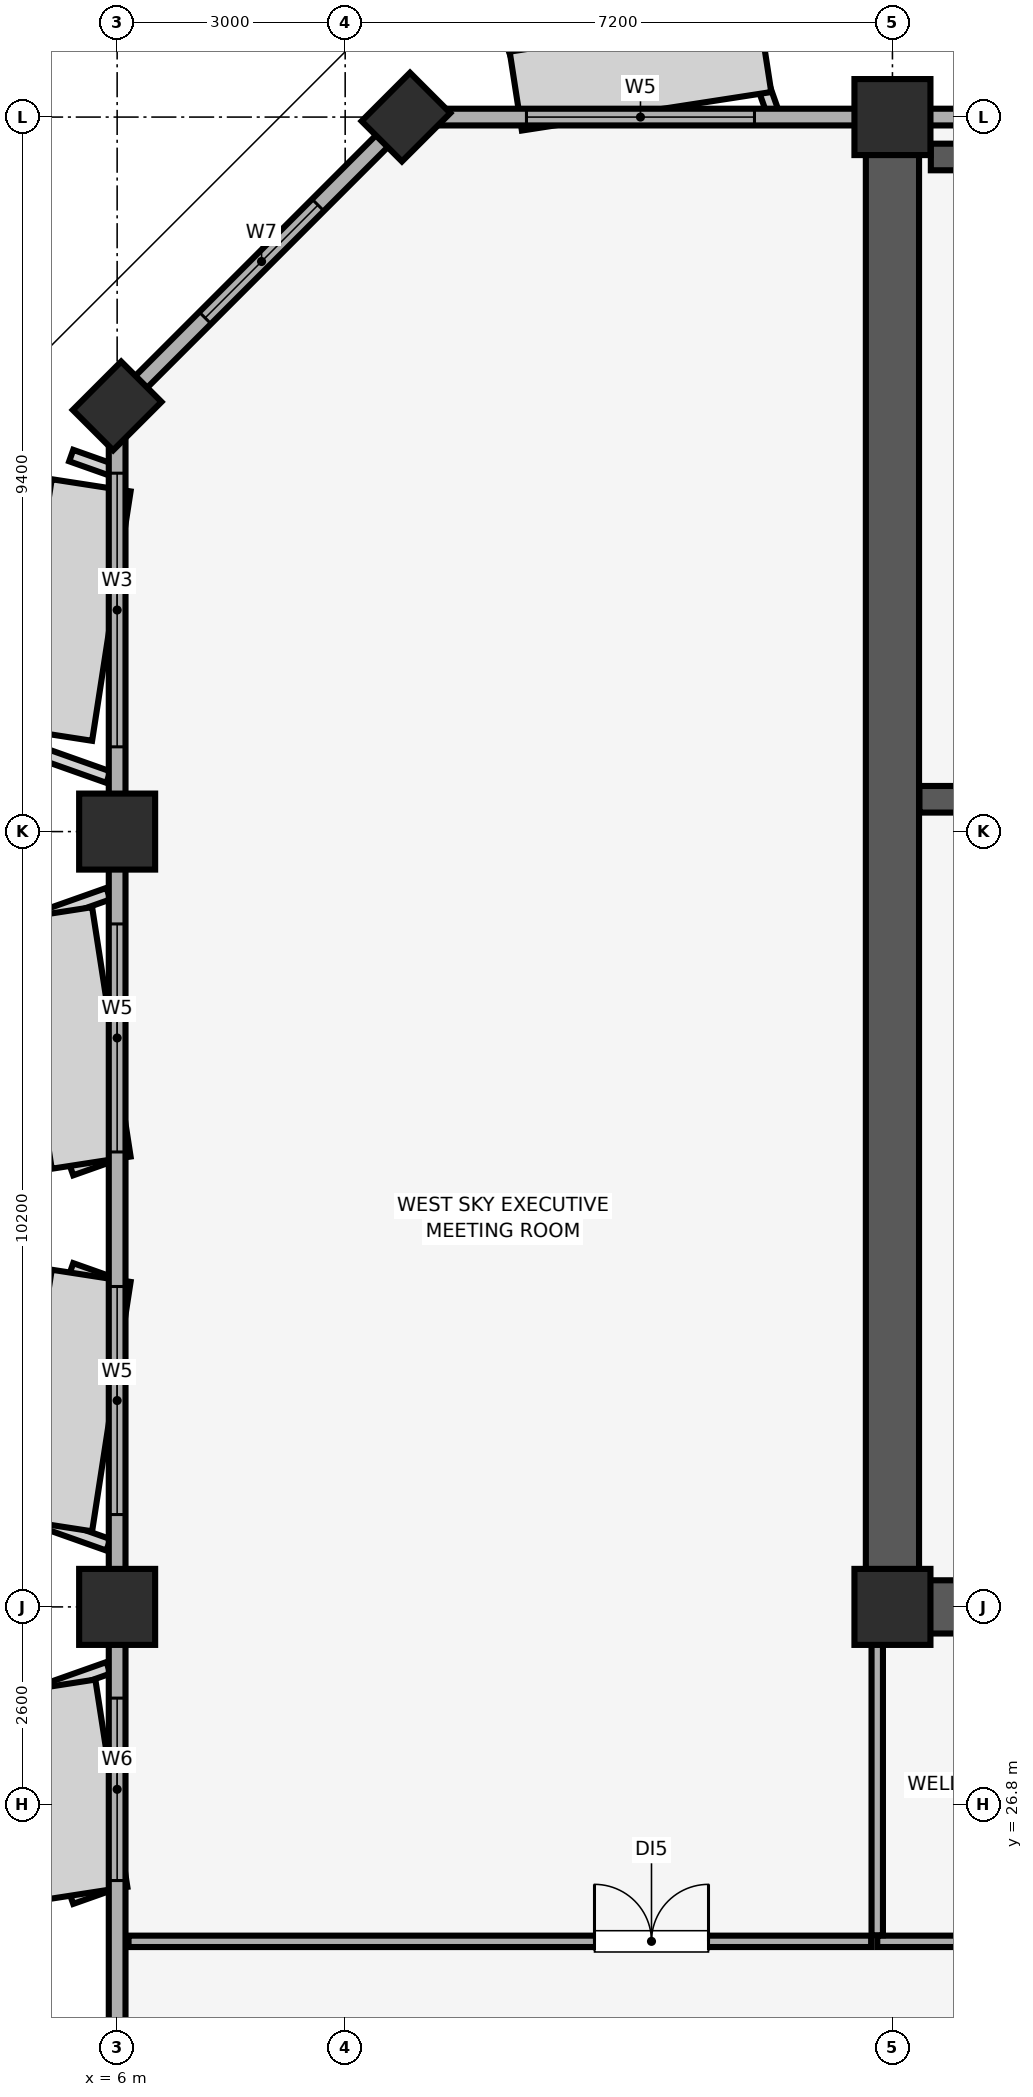
"""IFC4 building model, lengths in metres.
Left out: names, types, materials, properties, quantities, classifications, styles, units other than length and angle.
Written with IfcOpenShell. Run it as: python <this file> out.ifc"""

import sys

from ifc_helpers import new_model, si_unit, direction, frame, frame_2d, origin, origin_2d, place, context, subcontext, project, spatial, rectangle, extrude, element, fill, save


model = new_model("IFC4")
c1 = context("Model", 3, precision=1e-05, world=origin(), true_north=direction((0.0, 1.0)))
c2 = subcontext(c1, "Body", "Model", "MODEL_VIEW")
j1 = project(units=[si_unit("LENGTHUNIT", "METRE"), si_unit("PLANEANGLEUNIT", "RADIAN")], contexts=[c1])
p1 = place(None, origin())
s1 = spatial("IfcSite", under=j1, at=p1, CompositionType="ELEMENT")
p2 = place(p1, origin())
s2 = spatial("IfcBuilding", under=s1, at=p2, CompositionType="ELEMENT")
p3 = place(p2, frame((0.0, 0.0, 276.55)))
s3 = spatial("IfcBuildingStorey", under=s2, at=p3, CompositionType="ELEMENT", Elevation=276.55)
for number, where, z_axis, x_axis in (
    (1, (6.0, 29.4, 0.0), (0.0, 0.0, 1.0), (1.0, 0.0, 0.0)),
    (2, (6.0, 39.6, 0.0), (0.0, 0.0, 1.0), (1.0, 0.0, 0.0)),
):
    element("IfcColumn", number, at=place(p3, frame(where, z_axis=z_axis, x_axis=x_axis)), inside=s3, PredefinedType="COLUMN", context=c2, shape_type="SweptSolid", body=[
        extrude(rectangle(XDim=1.0, YDim=1.0, at=origin_2d()), origin(), (0.0, 0.0, 1.0), 3.6),
    ])
for number, where, z_axis, x_axis in (
    (3, (9.8, 49.0, 0.0), (0.0, 0.0, 1.0), (0.707, 0.707, 0.0)),
    (4, (6.0, 45.2, 0.0), (0.0, 0.0, 1.0), (0.707, 0.707, 0.0)),
):
    element("IfcColumn", number, at=place(p3, frame(where, z_axis=z_axis, x_axis=x_axis)), inside=s3, PredefinedType="PILASTER", context=c2, shape_type="SweptSolid", body=[
        extrude(rectangle(XDim=0.9, YDim=0.75, at=origin_2d()), origin(), (0.0, 0.0, 1.0), 3.6),
    ])
for number, where, z_axis, x_axis in (
    (5, (16.2, 29.4, 0.0), (0.0, 0.0, 1.0), (1.0, 0.0, 0.0)),
    (6, (16.2, 49.0, 0.0), (0.0, 0.0, 1.0), (1.0, 0.0, 0.0)),
):
    element("IfcColumn", number, at=place(p3, frame(where, z_axis=z_axis, x_axis=x_axis)), inside=s3, PredefinedType="COLUMN", context=c2, shape_type="SweptSolid", body=[
        extrude(rectangle(XDim=1.0, YDim=1.0, at=origin_2d()), origin(), (0.0, 0.0, 1.0), 3.6),
    ])
p4 = place(p3, frame((74.2, 49.0, 0.0), z_axis=(0.0, 0.0, 1.0), x_axis=(-1.0, 0.0, 0.0)))
e7 = element("IfcWall", 7, at=p4, inside=s3, PredefinedType="SOLIDWALL", context=c2, shape_type="SweptSolid", body=[
    extrude(rectangle(XDim=64.4, YDim=0.22, at=frame_2d((32.2, 0.0))), origin(), (0.0, 0.0, 1.0), 2.8),
])
p5 = place(p4, frame((59.815, 0.0, 0.85)))
e8 = element("IfcOpeningElement", 8, at=p5, cuts=e7, PredefinedType="OPENING", context=c2, shape_type="SweptSolid", body=[
    extrude(rectangle(XDim=3.0, YDim=1.5, at=frame_2d((1.5, 0.75))), frame((0.0, 0.12, 0.0), z_axis=(0.0, -1.0, 0.0), x_axis=(1.0, 0.0, 0.0)), (0.0, 0.0, 1.0), 0.24),
])
p6 = place(p4, frame((1.585, 0.0, 0.85)))
e9 = element("IfcOpeningElement", 9, at=p6, cuts=e7, PredefinedType="OPENING", context=c2, shape_type="SweptSolid", body=[
    extrude(rectangle(XDim=3.0, YDim=1.5, at=frame_2d((1.5, 0.75))), frame((0.0, 0.12, 0.0), z_axis=(0.0, -1.0, 0.0), x_axis=(1.0, 0.0, 0.0)), (0.0, 0.0, 1.0), 0.24),
])
p7 = place(p4, frame((46.665, 0.0, 0.9)))
e10 = element("IfcOpeningElement", 10, at=p7, cuts=e7, PredefinedType="OPENING", context=c2, shape_type="SweptSolid", body=[
    extrude(rectangle(XDim=1.5, YDim=1.4, at=frame_2d((0.75, 0.7))), frame((0.0, 0.12, 0.0), z_axis=(0.0, -1.0, 0.0), x_axis=(1.0, 0.0, 0.0)), (0.0, 0.0, 1.0), 0.24),
])
p8 = place(p4, frame((38.85, 0.0, 0.9)))
e11 = element("IfcOpeningElement", 11, at=p8, cuts=e7, PredefinedType="OPENING", context=c2, shape_type="SweptSolid", body=[
    extrude(rectangle(XDim=3.6, YDim=1.5, at=frame_2d((1.8, 0.75))), frame((0.0, 0.12, 0.0), z_axis=(0.0, -1.0, 0.0), x_axis=(1.0, 0.0, 0.0)), (0.0, 0.0, 1.0), 0.24),
])
p9 = place(p4, frame((25.45, 0.0, 0.9)))
e12 = element("IfcOpeningElement", 12, at=p9, cuts=e7, PredefinedType="OPENING", context=c2, shape_type="SweptSolid", body=[
    extrude(rectangle(XDim=1.5, YDim=1.4, at=frame_2d((0.75, 0.7))), frame((0.0, 0.12, 0.0), z_axis=(0.0, -1.0, 0.0), x_axis=(1.0, 0.0, 0.0)), (0.0, 0.0, 1.0), 0.24),
])
p10 = place(p4, frame((21.8, 0.0, 0.9)))
e13 = element("IfcOpeningElement", 13, at=p10, cuts=e7, PredefinedType="OPENING", context=c2, shape_type="SweptSolid", body=[
    extrude(rectangle(XDim=2.4, YDim=1.5, at=frame_2d((1.2, 0.75))), frame((0.0, 0.12, 0.0), z_axis=(0.0, -1.0, 0.0), x_axis=(1.0, 0.0, 0.0)), (0.0, 0.0, 1.0), 0.24),
])
p11 = place(p4, frame((17.435, 0.0, 0.9)))
e14 = element("IfcOpeningElement", 14, at=p11, cuts=e7, PredefinedType="OPENING", context=c2, shape_type="SweptSolid", body=[
    extrude(rectangle(XDim=2.4, YDim=1.5, at=frame_2d((1.2, 0.75))), frame((0.0, 0.12, 0.0), z_axis=(0.0, -1.0, 0.0), x_axis=(1.0, 0.0, 0.0)), (0.0, 0.0, 1.0), 0.24),
])
p12 = place(p3, frame((9.8, 49.0, 0.0), z_axis=(0.0, 0.0, 1.0), x_axis=(-0.707106781187, -0.707106781187, 0.0)))
e15 = element("IfcWall", 15, at=p12, inside=s3, PredefinedType="SOLIDWALL", context=c2, shape_type="SweptSolid", body=[
    extrude(rectangle(XDim=5.374, YDim=0.22, at=frame_2d((2.687, 0.0))), origin(), (0.0, 0.0, 1.0), 2.8),
])
p13 = place(p12, frame((1.637, 0.0, 0.85)))
e16 = element("IfcOpeningElement", 16, at=p13, cuts=e15, PredefinedType="OPENING", context=c2, shape_type="SweptSolid", body=[
    extrude(rectangle(XDim=2.1, YDim=1.6, at=frame_2d((1.05, 0.8))), frame((0.0, 0.12, 0.0), z_axis=(0.0, -1.0, 0.0), x_axis=(1.0, 0.0, 0.0)), (0.0, 0.0, 1.0), 0.24),
])
p14 = place(p3, frame((6.0, 45.2, 0.0), z_axis=(0.0, 0.0, 1.0), x_axis=(0.0, -1.0, 0.0)))
e17 = element("IfcWall", 17, at=p14, inside=s3, PredefinedType="SOLIDWALL", context=c2, shape_type="SweptSolid", body=[
    extrude(rectangle(XDim=35.4, YDim=0.22, at=frame_2d((17.7, 0.0))), origin(), (0.0, 0.0, 1.0), 2.8),
])
p15 = place(p14, frame((31.415, 0.0, 0.85)))
e18 = element("IfcOpeningElement", 18, at=p15, cuts=e17, PredefinedType="OPENING", context=c2, shape_type="SweptSolid", body=[
    extrude(rectangle(XDim=3.0, YDim=1.5, at=frame_2d((1.5, 0.75))), frame((0.0, 0.12, 0.0), z_axis=(0.0, -1.0, 0.0), x_axis=(1.0, 0.0, 0.0)), (0.0, 0.0, 1.0), 0.24),
])
p16 = place(p14, frame((24.2, 0.0, 0.85)))
e19 = element("IfcOpeningElement", 19, at=p16, cuts=e17, PredefinedType="OPENING", context=c2, shape_type="SweptSolid", body=[
    extrude(rectangle(XDim=3.6, YDim=1.65, at=frame_2d((1.8, 0.825))), frame((0.0, 0.12, 0.0), z_axis=(0.0, -1.0, 0.0), x_axis=(1.0, 0.0, 0.0)), (0.0, 0.0, 1.0), 0.24),
])
p17 = place(p14, frame((17.0, 0.0, 0.85)))
e20 = element("IfcOpeningElement", 20, at=p17, cuts=e17, PredefinedType="OPENING", context=c2, shape_type="SweptSolid", body=[
    extrude(rectangle(XDim=2.4, YDim=1.5, at=frame_2d((1.2, 0.75))), frame((0.0, 0.12, 0.0), z_axis=(0.0, -1.0, 0.0), x_axis=(1.0, 0.0, 0.0)), (0.0, 0.0, 1.0), 0.24),
])
p18 = place(p14, frame((11.585, 0.0, 0.85)))
e21 = element("IfcOpeningElement", 21, at=p18, cuts=e17, PredefinedType="OPENING", context=c2, shape_type="SweptSolid", body=[
    extrude(rectangle(XDim=3.0, YDim=1.5, at=frame_2d((1.5, 0.75))), frame((0.0, 0.12, 0.0), z_axis=(0.0, -1.0, 0.0), x_axis=(1.0, 0.0, 0.0)), (0.0, 0.0, 1.0), 0.24),
])
p19 = place(p14, frame((6.815, 0.0, 0.85)))
e22 = element("IfcOpeningElement", 22, at=p19, cuts=e17, PredefinedType="OPENING", context=c2, shape_type="SweptSolid", body=[
    extrude(rectangle(XDim=3.0, YDim=1.5, at=frame_2d((1.5, 0.75))), frame((0.0, 0.12, 0.0), z_axis=(0.0, -1.0, 0.0), x_axis=(1.0, 0.0, 0.0)), (0.0, 0.0, 1.0), 0.24),
])
p20 = place(p14, frame((0.885, 0.0, 0.85)))
e23 = element("IfcOpeningElement", 23, at=p20, cuts=e17, PredefinedType="OPENING", context=c2, shape_type="SweptSolid", body=[
    extrude(rectangle(XDim=3.6, YDim=1.65, at=frame_2d((1.8, 0.825))), frame((0.0, 0.12, 0.0), z_axis=(0.0, -1.0, 0.0), x_axis=(1.0, 0.0, 0.0)), (0.0, 0.0, 1.0), 0.24),
])
p21 = place(p3, frame((16.2, 29.4, 0.0), z_axis=(0.0, 0.0, 1.0), x_axis=(0.0, 1.0, 0.0)))
e24 = element("IfcWall", 24, at=p21, inside=s3, PredefinedType="SHEAR", context=c2, shape_type="SweptSolid", body=[
    extrude(rectangle(XDim=19.2, YDim=0.7, at=frame_2d((9.6, 0.0))), origin(), (0.0, 0.0, 1.0), 3.6),
])
p22 = place(p3, frame((16.555, 29.4, 0.0), z_axis=(0.0, 0.0, 1.0), x_axis=(1.0, 0.0, 0.0)))
e25 = element("IfcWall", 25, at=p22, inside=s3, PredefinedType="SHEAR", context=c2, shape_type="SweptSolid", body=[
    extrude(rectangle(XDim=7.045, YDim=0.7, at=frame_2d((3.522, 0.0))), origin(), (0.0, 0.0, 1.0), 3.6),
])
p23 = place(p3, frame((16.555, 40.025, 0.0), z_axis=(0.0, 0.0, 1.0), x_axis=(1.0, 0.0, 0.0)))
e26 = element("IfcWall", 26, at=p23, inside=s3, PredefinedType="SHEAR", context=c2, shape_type="SweptSolid", body=[
    extrude(rectangle(XDim=4.3, YDim=0.35, at=frame_2d((2.15, 0.0))), origin(), (0.0, 0.0, 1.0), 3.6),
])
p24 = place(p23, frame((1.91, 0.0, 0.0)))
e27 = element("IfcOpeningElement", 27, at=p24, cuts=e26, PredefinedType="OPENING", context=c2, shape_type="SweptSolid", body=[
    extrude(rectangle(XDim=1.15, YDim=2.15, at=frame_2d((0.575, 1.075))), frame((0.0, 0.185, 0.0), z_axis=(0.0, -1.0, 0.0), x_axis=(1.0, 0.0, 0.0)), (0.0, 0.0, 1.0), 0.37),
])
p25 = place(p3, frame((16.705, 48.475, 0.0), z_axis=(0.0, 0.0, 1.0), x_axis=(1.0, 0.0, 0.0)))
e28 = element("IfcWall", 28, at=p25, inside=s3, PredefinedType="SHEAR", context=c2, shape_type="SweptSolid", body=[
    extrude(rectangle(XDim=4.15, YDim=0.35, at=frame_2d((2.075, 0.0))), origin(), (0.0, 0.0, 1.0), 3.6),
])
p26 = place(p3, frame((16.0, 25.0, 0.0), z_axis=(0.0, 0.0, 1.0), x_axis=(1.0, 0.0, 0.0)))
e29 = element("IfcWall", 29, at=p26, inside=s3, PredefinedType="PARTITIONING", context=c2, shape_type="SweptSolid", body=[
    extrude(rectangle(XDim=9.0, YDim=0.15, at=frame_2d((4.5, 0.0))), origin(), (0.0, 0.0, 1.0), 3.6),
])
p27 = place(p26, frame((4.0, 0.0, 0.0)))
e30 = element("IfcOpeningElement", 30, at=p27, cuts=e29, PredefinedType="OPENING", context=c2, shape_type="SweptSolid", body=[
    extrude(rectangle(XDim=1.0, YDim=2.15, at=frame_2d((0.5, 1.075))), frame((0.0, 0.085, 0.0), z_axis=(0.0, -1.0, 0.0), x_axis=(1.0, 0.0, 0.0)), (0.0, 0.0, 1.0), 0.17),
])
p28 = place(p3, frame((16.0, 25.08, 0.0), z_axis=(0.0, 0.0, 1.0), x_axis=(0.0, 1.0, 0.0)))
e31 = element("IfcWall", 31, at=p28, inside=s3, PredefinedType="PARTITIONING", context=c2, shape_type="SweptSolid", body=[
    extrude(rectangle(XDim=4.31, YDim=0.15, at=frame_2d((2.155, 0.0))), origin(), (0.0, 0.0, 1.0), 3.1),
])
p29 = place(p3, frame((6.15, 25.0, 0.0), z_axis=(0.0, 0.0, 1.0), x_axis=(1.0, 0.0, 0.0)))
e32 = element("IfcWall", 32, at=p29, inside=s3, PredefinedType="PARTITIONING", context=c2, shape_type="SweptSolid", body=[
    extrude(rectangle(XDim=9.77, YDim=0.15, at=frame_2d((4.885, 0.0))), origin(), (0.0, 0.0, 1.0), 3.6),
])
p30 = place(p29, frame((6.13, 0.0, 0.0)))
e33 = element("IfcOpeningElement", 33, at=p30, cuts=e32, PredefinedType="OPENING", context=c2, shape_type="SweptSolid", body=[
    extrude(rectangle(XDim=1.5, YDim=2.25, at=frame_2d((0.75, 1.125))), frame((0.0, 0.085, 0.0), z_axis=(0.0, -1.0, 0.0), x_axis=(1.0, 0.0, 0.0)), (0.0, 0.0, 1.0), 0.17),
])
p31 = place(p13, origin())
e34 = element("IfcWindow", 34, at=p31, inside=s3, PartitioningType="SINGLE_PANEL", PredefinedType="WINDOW", context=c2, shape_type="SweptSolid", body=[
    extrude(rectangle(XDim=2.1, YDim=1.6, at=frame_2d((1.05, 0.8))), frame((0.0, 0.03, 0.0), z_axis=(0.0, -1.0, 0.0), x_axis=(1.0, 0.0, 0.0)), (0.0, 0.0, 1.0), 0.06),
])
fill(e16, e34)
p32 = place(p17, origin())
e35 = element("IfcWindow", 35, at=p32, inside=s3, PartitioningType="SINGLE_PANEL", PredefinedType="WINDOW", context=c2, shape_type="SweptSolid", body=[
    extrude(rectangle(XDim=2.4, YDim=1.5, at=frame_2d((1.2, 0.75))), frame((0.0, 0.03, 0.0), z_axis=(0.0, -1.0, 0.0), x_axis=(1.0, 0.0, 0.0)), (0.0, 0.0, 1.0), 0.06),
])
fill(e20, e35)
p33 = place(p18, origin())
e36 = element("IfcWindow", 36, at=p33, inside=s3, PartitioningType="SINGLE_PANEL", PredefinedType="WINDOW", context=c2, shape_type="SweptSolid", body=[
    extrude(rectangle(XDim=3.0, YDim=1.5, at=frame_2d((1.5, 0.75))), frame((0.0, 0.03, 0.0), z_axis=(0.0, -1.0, 0.0), x_axis=(1.0, 0.0, 0.0)), (0.0, 0.0, 1.0), 0.06),
])
fill(e21, e36)
p34 = place(p19, origin())
e37 = element("IfcWindow", 37, at=p34, inside=s3, PartitioningType="SINGLE_PANEL", PredefinedType="WINDOW", context=c2, shape_type="SweptSolid", body=[
    extrude(rectangle(XDim=3.0, YDim=1.5, at=frame_2d((1.5, 0.75))), frame((0.0, 0.03, 0.0), z_axis=(0.0, -1.0, 0.0), x_axis=(1.0, 0.0, 0.0)), (0.0, 0.0, 1.0), 0.06),
])
fill(e22, e37)
p35 = place(p20, origin())
e38 = element("IfcWindow", 38, at=p35, inside=s3, PartitioningType="SINGLE_PANEL", PredefinedType="WINDOW", context=c2, shape_type="SweptSolid", body=[
    extrude(rectangle(XDim=3.6, YDim=1.65, at=frame_2d((1.8, 0.825))), frame((0.0, 0.03, 0.0), z_axis=(0.0, -1.0, 0.0), x_axis=(1.0, 0.0, 0.0)), (0.0, 0.0, 1.0), 0.06),
])
fill(e23, e38)
p36 = place(p5, origin())
e39 = element("IfcWindow", 39, at=p36, inside=s3, PartitioningType="SINGLE_PANEL", PredefinedType="WINDOW", context=c2, shape_type="SweptSolid", body=[
    extrude(rectangle(XDim=3.0, YDim=1.5, at=frame_2d((1.5, 0.75))), frame((0.0, 0.03, 0.0), z_axis=(0.0, -1.0, 0.0), x_axis=(1.0, 0.0, 0.0)), (0.0, 0.0, 1.0), 0.06),
])
fill(e8, e39)
p37 = place(p30, origin())
e40 = element("IfcDoor", 40, at=p37, inside=s3, OperationType="DOUBLE_DOOR_SINGLE_SWING", PredefinedType="DOOR", context=c2, shape_type="SweptSolid", body=[
    extrude(rectangle(XDim=1.5, YDim=2.25, at=frame_2d((0.75, 1.125))), frame((0.0, 0.025, 0.0), z_axis=(0.0, -1.0, 0.0), x_axis=(1.0, 0.0, 0.0)), (0.0, 0.0, 1.0), 0.05),
])
fill(e33, e40)
save(model, sys.argv[1])
